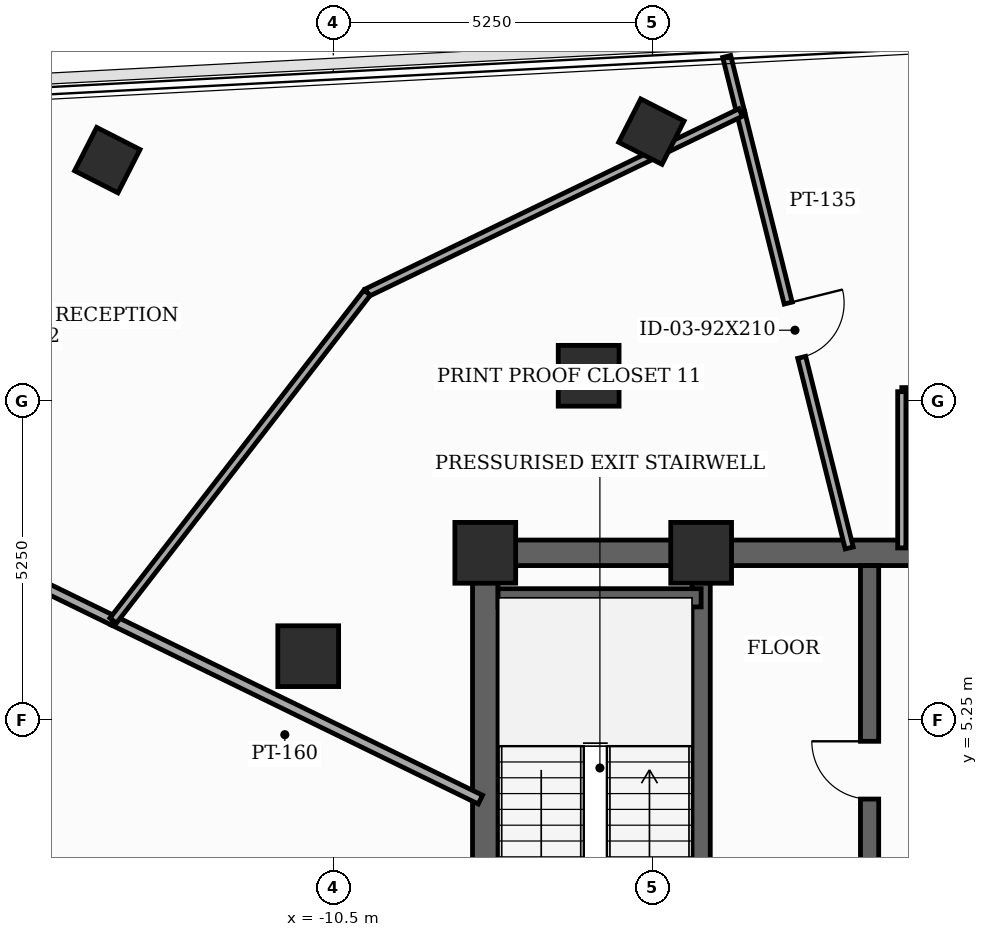
"""IFC4 building model, lengths in metres.
Left out: names, types, materials, properties, quantities, classifications, styles, units other than length and angle.
Written with IfcOpenShell. Run it as: python <this file> out.ifc"""

import sys

from ifc_helpers import new_model, si_unit, direction, frame, frame_2d, origin, origin_2d, place, context, subcontext, project, spatial, rectangle, extrude, element, fill, save


model = new_model("IFC4")
c1 = context("Model", 3, precision=1e-05, world=origin(), true_north=direction((0.0, 1.0)))
c2 = subcontext(c1, "Body", "Model", "MODEL_VIEW")
j1 = project(units=[si_unit("LENGTHUNIT", "METRE"), si_unit("PLANEANGLEUNIT", "RADIAN")], contexts=[c1])
p1 = place(None, origin())
s1 = spatial("IfcSite", under=j1, at=p1, CompositionType="ELEMENT")
p2 = place(p1, origin())
s2 = spatial("IfcBuilding", under=s1, at=p2, CompositionType="ELEMENT")
p3 = place(p2, frame((0.0, 0.0, 252.2)))
s3 = spatial("IfcBuildingStorey", under=s2, at=p3, CompositionType="ELEMENT", Elevation=252.2)
for number, where, z_axis, x_axis in (
    (1, (-4.45, 8.0, 0.0), (0.0, 0.0, 1.0), (1.0, 0.0, 0.0)),
    (2, (-8.0, 8.0, 0.0), (0.0, 0.0, 1.0), (1.0, 0.0, 0.0)),
    (3, (-6.3, 10.912, 0.0), (0.0, 0.0, 1.0), (1.0, 0.0, 0.0)),
    (4, (-10.912, 6.3, 0.0), (0.0, 0.0, 1.0), (1.0, 0.0, 0.0)),
):
    element("IfcColumn", number, at=place(p3, frame(where, z_axis=z_axis, x_axis=x_axis)), inside=s3, PredefinedType="COLUMN", context=c2, shape_type="SweptSolid", body=[
        extrude(rectangle(XDim=1.0, YDim=1.0, at=origin_2d()), origin(), (0.0, 0.0, 1.0), 3.7),
    ])
for number, where, z_axis, x_axis in (
    (5, (-5.269, 14.927, 0.0), (0.0, 0.0, 1.0), (0.454, 0.891, 0.0)),
    (6, (-14.216, 14.458, 0.0), (0.0, 0.0, 1.0), (0.454, 0.891, 0.0)),
):
    element("IfcColumn", number, at=place(p3, frame(where, z_axis=z_axis, x_axis=x_axis)), inside=s3, PredefinedType="COLUMN", context=c2, shape_type="SweptSolid", body=[
        extrude(rectangle(XDim=0.8, YDim=0.8, at=origin_2d()), origin(), (0.0, 0.0, 1.0), 3.7),
    ])
p4 = place(p3, frame((-8.0, -8.0, 0.0), z_axis=(0.0, 0.0, 1.0), x_axis=(0.0, 1.0, 0.0)))
e7 = element("IfcWall", 7, at=p4, inside=s3, PredefinedType="SHEAR", context=c2, shape_type="SweptSolid", body=[
    extrude(rectangle(XDim=16.0, YDim=0.42, at=frame_2d((8.0, 0.0))), origin(), (0.0, 0.0, 1.0), 3.5),
])
p5 = place(p4, frame((0.681, 0.0, 0.0)))
e8 = element("IfcOpeningElement", 8, at=p5, cuts=e7, PredefinedType="OPENING", context=c2, shape_type="SweptSolid", body=[
    extrude(rectangle(XDim=0.85, YDim=2.02, at=frame_2d((0.425, 1.01))), frame((0.0, 0.22, 0.0), z_axis=(0.0, -1.0, 0.0), x_axis=(1.0, 0.0, 0.0)), (0.0, 0.0, 1.0), 0.44),
])
p6 = place(p4, frame((5.35, 0.0, 0.0)))
e9 = element("IfcOpeningElement", 9, at=p6, cuts=e7, PredefinedType="OPENING", context=c2, shape_type="SweptSolid", body=[
    extrude(rectangle(XDim=1.05, YDim=2.15, at=frame_2d((0.525, 1.075))), frame((0.0, 0.22, 0.0), z_axis=(0.0, -1.0, 0.0), x_axis=(1.0, 0.0, 0.0)), (0.0, 0.0, 1.0), 0.44),
])
p7 = place(p3, frame((-8.0, 8.0, 0.0), z_axis=(0.0, 0.0, 1.0), x_axis=(1.0, 0.0, 0.0)))
e10 = element("IfcWall", 10, at=p7, inside=s3, PredefinedType="SHEAR", context=c2, shape_type="SweptSolid", body=[
    extrude(rectangle(XDim=16.0, YDim=0.42, at=frame_2d((8.0, 0.0))), origin(), (0.0, 0.0, 1.0), 3.5),
])
p8 = place(p7, frame((7.1, 0.0, 0.0)))
e11 = element("IfcOpeningElement", 11, at=p8, cuts=e10, PredefinedType="OPENING", context=c2, shape_type="SweptSolid", body=[
    extrude(rectangle(XDim=1.8, YDim=2.15, at=frame_2d((0.9, 1.075))), frame((0.0, 0.22, 0.0), z_axis=(0.0, -1.0, 0.0), x_axis=(1.0, 0.0, 0.0)), (0.0, 0.0, 1.0), 0.44),
])
p9 = place(p3, frame((-4.45, -7.79, 0.0), z_axis=(0.0, 0.0, 1.0), x_axis=(0.0, 1.0, 0.0)))
e12 = element("IfcWall", 12, at=p9, inside=s3, PredefinedType="SHEAR", context=c2, shape_type="SweptSolid", body=[
    extrude(rectangle(XDim=15.58, YDim=0.3, at=frame_2d((7.79, 0.0))), origin(), (0.0, 0.0, 1.0), 3.5),
])
p10 = place(p3, frame((-7.79, 7.26, 0.0), z_axis=(0.0, 0.0, 1.0), x_axis=(1.0, 0.0, 0.0)))
e13 = element("IfcWall", 13, at=p10, inside=s3, PredefinedType="SHEAR", context=c2, shape_type="SweptSolid", body=[
    extrude(rectangle(XDim=3.34, YDim=0.3, at=frame_2d((1.67, 0.0))), origin(), (0.0, 0.0, 1.0), 3.5),
])
p11 = place(p3, frame((-1.68, -4.85, 0.0), z_axis=(0.0, 0.0, 1.0), x_axis=(0.0, 1.0, 0.0)))
e14 = element("IfcWall", 14, at=p11, inside=s3, PredefinedType="SHEAR", context=c2, shape_type="SweptSolid", body=[
    extrude(rectangle(XDim=12.64, YDim=0.3, at=frame_2d((6.32, 0.0))), origin(), (0.0, 0.0, 1.0), 3.5),
])
p12 = place(p11, frame((2.6, 0.0, 0.0)))
e15 = element("IfcOpeningElement", 15, at=p12, cuts=e14, PredefinedType="OPENING", context=c2, shape_type="SweptSolid", body=[
    extrude(rectangle(XDim=0.95, YDim=2.1, at=frame_2d((0.475, 1.05))), frame((0.0, 0.16, 0.0), z_axis=(0.0, -1.0, 0.0), x_axis=(1.0, 0.0, 0.0)), (0.0, 0.0, 1.0), 0.32),
])
p13 = place(p11, frame((8.8, 0.0, 0.0)))
e16 = element("IfcOpeningElement", 16, at=p13, cuts=e14, PredefinedType="OPENING", context=c2, shape_type="SweptSolid", body=[
    extrude(rectangle(XDim=0.95, YDim=2.1, at=frame_2d((0.475, 1.05))), frame((0.0, 0.16, 0.0), z_axis=(0.0, -1.0, 0.0), x_axis=(1.0, 0.0, 0.0)), (0.0, 0.0, 1.0), 0.32),
])
p14 = place(p3, frame((4.742, 10.65, 0.0), z_axis=(0.0, 0.0, 1.0), x_axis=(-1.0, 0.0, 0.0)))
e17 = element("IfcWall", 17, at=p14, inside=s3, PredefinedType="PARTITIONING", context=c2, shape_type="SweptSolid", body=[
    extrude(rectangle(XDim=5.892, YDim=0.135, at=frame_2d((2.946, 0.0))), origin(), (0.0, 0.0, 1.0), 2.885),
])
p15 = place(p14, frame((2.471, 0.0, 0.0)))
e18 = element("IfcOpeningElement", 18, at=p15, cuts=e17, PredefinedType="OPENING", context=c2, shape_type="SweptSolid", body=[
    extrude(rectangle(XDim=0.95, YDim=2.1, at=frame_2d((0.475, 1.05))), frame((0.0, 0.077, 0.0), z_axis=(0.0, -1.0, 0.0), x_axis=(1.0, 0.0, 0.0)), (0.0, 0.0, 1.0), 0.155),
])
p16 = place(p3, frame((-1.15, 10.65, 0.0), z_axis=(0.0, 0.0, 1.0), x_axis=(0.0, -1.0, 0.0)))
e19 = element("IfcWall", 19, at=p16, inside=s3, PredefinedType="PARTITIONING", context=c2, shape_type="SweptSolid", body=[
    extrude(rectangle(XDim=2.57, YDim=0.135, at=frame_2d((1.285, 0.0))), origin(), (0.0, 0.0, 1.0), 2.885),
])
p17 = place(p3, frame((-8.08, 3.941, 0.0), z_axis=(0.0, 0.0, 1.0), x_axis=(-0.898794985177, 0.438369221798, 0.0)))
e20 = element("IfcWall", 20, at=p17, inside=s3, PredefinedType="PARTITIONING", context=c2, shape_type="SweptSolid", body=[
    extrude(rectangle(XDim=6.719, YDim=0.16, at=frame_2d((3.359, 0.0))), origin(), (0.0, 0.0, 1.0), 2.885),
])
p18 = place(p3, frame((-14.119, 6.886, 0.0), z_axis=(0.0, 0.0, 1.0), x_axis=(-0.898768620199, 0.438423274184, 0.0)))
e21 = element("IfcWall", 21, at=p18, inside=s3, PredefinedType="PARTITIONING", context=c2, shape_type="SweptSolid", body=[
    extrude(rectangle(XDim=13.442, YDim=0.16, at=frame_2d((6.721, 0.0))), origin(), (0.0, 0.0, 1.0), 3.035),
])
p19 = place(p18, frame((6.261, 0.0, 0.0)))
e22 = element("IfcOpeningElement", 22, at=p19, cuts=e21, PredefinedType="OPENING", context=c2, shape_type="SweptSolid", body=[
    extrude(rectangle(XDim=0.92, YDim=2.1, at=frame_2d((0.46, 1.05))), frame((0.0, 0.09, 0.0), z_axis=(0.0, -1.0, 0.0), x_axis=(1.0, 0.0, 0.0)), (0.0, 0.0, 1.0), 0.18),
])
p20 = place(p3, frame((-3.8, 15.242, 0.0), z_axis=(0.0, 0.0, 1.0), x_axis=(0.241889603588, -0.970303777008, 0.0)))
e23 = element("IfcWall", 23, at=p20, inside=s3, PredefinedType="PARTITIONING", context=c2, shape_type="SweptSolid", body=[
    extrude(rectangle(XDim=7.381, YDim=0.135, at=frame_2d((3.69, 0.0))), origin(), (0.0, 0.0, 1.0), 2.885),
])
p21 = place(p20, frame((3.231, 0.0, 0.0)))
e24 = element("IfcOpeningElement", 24, at=p21, cuts=e23, PredefinedType="OPENING", context=c2, shape_type="SweptSolid", body=[
    extrude(rectangle(XDim=0.92, YDim=2.1, at=frame_2d((0.46, 1.05))), frame((0.0, 0.077, 0.0), z_axis=(0.0, -1.0, 0.0), x_axis=(1.0, 0.0, 0.0)), (0.0, 0.0, 1.0), 0.155),
])
p22 = place(p3, frame((-4.03, 16.164, 0.0), z_axis=(0.0, 0.0, 1.0), x_axis=(0.241809991188, -0.970323620326, 0.0)))
e25 = element("IfcWall", 25, at=p22, inside=s3, PredefinedType="PARTITIONING", context=c2, shape_type="SweptSolid", body=[
    extrude(rectangle(XDim=0.95, YDim=0.135, at=frame_2d((0.475, 0.0))), origin(), (0.0, 0.0, 1.0), 3.5),
])
p23 = place(p3, frame((-3.8, 15.242, 0.0), z_axis=(0.0, 0.0, 1.0), x_axis=(-0.900708156853, -0.434424695635, 0.0)))
e26 = element("IfcWall", 26, at=p23, inside=s3, PredefinedType="PARTITIONING", context=c2, shape_type="SweptSolid", body=[
    extrude(rectangle(XDim=6.82, YDim=0.135, at=frame_2d((3.41, 0.0))), origin(), (0.0, 0.0, 1.0), 3.035),
])
p24 = place(p3, frame((-9.943, 12.279, 0.0), z_axis=(0.0, 0.0, 1.0), x_axis=(-0.612219395693, -0.790687935621, 0.0)))
e27 = element("IfcWall", 27, at=p24, inside=s3, PredefinedType="PARTITIONING", context=c2, shape_type="SweptSolid", body=[
    extrude(rectangle(XDim=6.821, YDim=0.135, at=frame_2d((3.41, 0.0))), origin(), (0.0, 0.0, 1.0), 3.185),
])
p25 = place(p13, origin())
e28 = element("IfcDoor", 28, at=p25, inside=s3, OperationType="SINGLE_SWING_RIGHT", PredefinedType="DOOR", context=c2, shape_type="SweptSolid", body=[
    extrude(rectangle(XDim=0.95, YDim=2.1, at=frame_2d((0.475, 1.05))), frame((0.0, 0.025, 0.0), z_axis=(0.0, -1.0, 0.0), x_axis=(1.0, 0.0, 0.0)), (0.0, 0.0, 1.0), 0.05),
])
fill(e16, e28)
p26 = place(p21, origin())
e29 = element("IfcDoor", 29, at=p26, inside=s3, OperationType="SINGLE_SWING_LEFT", PredefinedType="DOOR", context=c2, shape_type="SweptSolid", body=[
    extrude(rectangle(XDim=0.92, YDim=2.1, at=frame_2d((0.46, 1.05))), frame((0.0, 0.025, 0.0), z_axis=(0.0, -1.0, 0.0), x_axis=(1.0, 0.0, 0.0)), (0.0, 0.0, 1.0), 0.05),
])
fill(e24, e29)
save(model, sys.argv[1])
